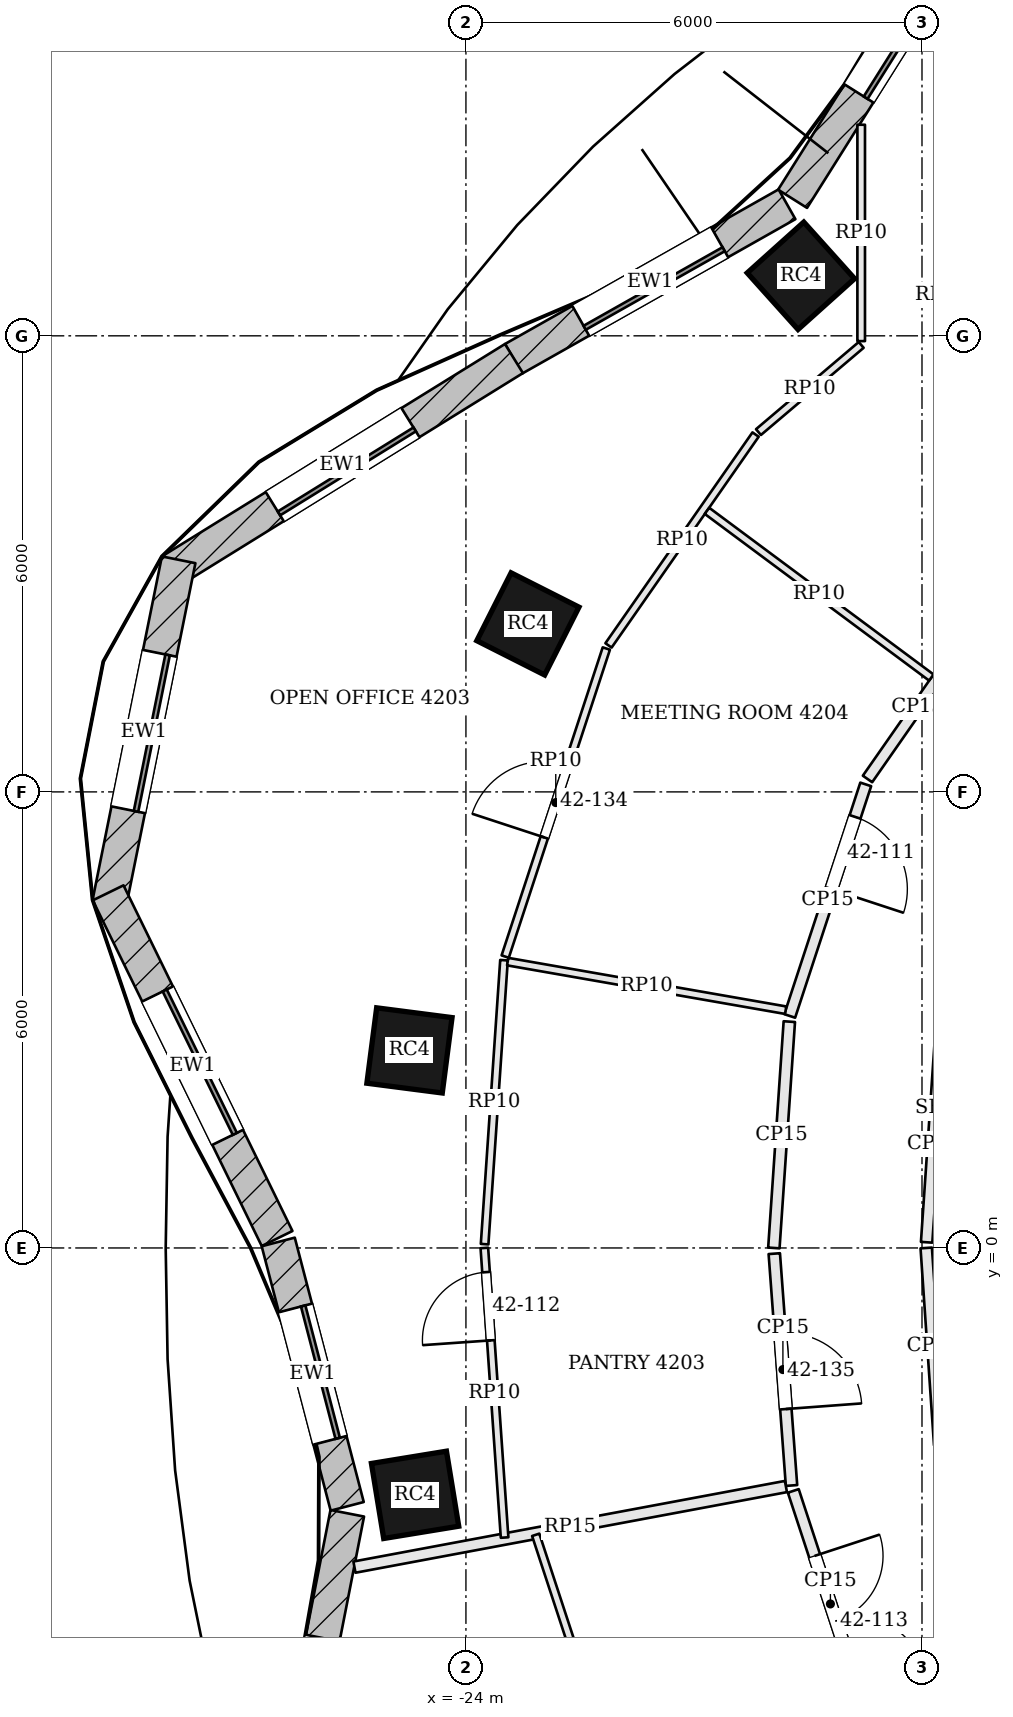
"""IFC4 building model, lengths in metres.
Left out: names, types, materials, properties, quantities, classifications, styles, units other than length and angle.
Written with IfcOpenShell. Run it as: python <this file> out.ifc"""

import sys

from ifc_helpers import new_model, si_unit, direction, frame, frame_2d, origin, origin_2d, place, context, subcontext, project, spatial, rectangle, extrude, element, fill, save


model = new_model("IFC4")
c1 = context("Model", 3, precision=1e-05, world=origin(), true_north=direction((0.0, 1.0)))
c2 = subcontext(c1, "Body", "Model", "MODEL_VIEW")
j1 = project(units=[si_unit("LENGTHUNIT", "METRE"), si_unit("PLANEANGLEUNIT", "RADIAN")], contexts=[c1])
p1 = place(None, origin())
s1 = spatial("IfcSite", under=j1, at=p1, CompositionType="ELEMENT")
p2 = place(p1, origin())
s2 = spatial("IfcBuilding", under=s1, at=p2, CompositionType="ELEMENT")
p3 = place(p2, frame((0.0, 0.0, 174.0)))
s3 = spatial("IfcBuildingStorey", under=s2, at=p3, CompositionType="ELEMENT", Elevation=174.0)
for number, where, z_axis, x_axis in (
    (1, (-19.593, 12.79, -0.7), (0.0, 0.0, 1.0), (-0.744, -0.668, 0.0)),
    (2, (-23.185, 8.21, -0.7), (0.0, 0.0, 1.0), (-0.451, -0.893, 0.0)),
    (3, (-24.743, 2.599, -0.7), (0.0, 0.0, 1.0), (-0.128, -0.992, 0.0)),
    (4, (-24.669, -3.248, -0.7), (0.0, 0.0, 1.0), (0.162, -0.987, 0.0)),
):
    element("IfcColumn", number, at=place(p3, frame(where, z_axis=z_axis, x_axis=x_axis)), inside=s3, PredefinedType="COLUMN", context=c2, shape_type="SweptSolid", body=[
        extrude(rectangle(XDim=1.0, YDim=1.0, at=origin_2d()), origin(), (0.0, 0.0, 1.0), 4.6),
    ])
p4 = place(p3, frame((-16.998, 18.099, 0.0), z_axis=(0.0, 0.0, 1.0), x_axis=(-0.532745661304, -0.846275404559, 0.0)))
e5 = element("IfcWall", 5, at=p4, inside=s3, PredefinedType="SOLIDWALL", context=c2, shape_type="SweptSolid", body=[
    extrude(rectangle(XDim=5.076, YDim=0.45, at=frame_2d((2.538, 0.0))), origin(), (0.0, 0.0, 1.0), 3.7),
])
p5 = place(p4, frame((1.638, 0.0, 0.9)))
e6 = element("IfcOpeningElement", 6, at=p5, cuts=e5, PredefinedType="OPENING", context=c2, shape_type="SweptSolid", body=[
    extrude(rectangle(XDim=1.8, YDim=2.3, at=frame_2d((0.9, 1.15))), frame((0.0, 0.235, 0.0), z_axis=(0.0, -1.0, 0.0), x_axis=(1.0, 0.0, 0.0)), (0.0, 0.0, 1.0), 0.47),
])
p6 = place(p3, frame((-19.776, 13.731, 0.0), z_axis=(0.0, 0.0, 1.0), x_axis=(-0.870610133829, -0.491973571318, 0.0)))
e7 = element("IfcWall", 7, at=p6, inside=s3, PredefinedType="SOLIDWALL", context=c2, shape_type="SweptSolid", body=[
    extrude(rectangle(XDim=4.134, YDim=0.45, at=frame_2d((2.067, 0.0))), origin(), (0.0, 0.0, 1.0), 3.7),
])
p7 = place(p6, frame((1.017, 0.0, 0.9)))
e8 = element("IfcOpeningElement", 8, at=p7, cuts=e7, PredefinedType="OPENING", context=c2, shape_type="SweptSolid", body=[
    extrude(rectangle(XDim=2.1, YDim=2.3, at=frame_2d((1.05, 1.15))), frame((0.0, 0.235, 0.0), z_axis=(0.0, -1.0, 0.0), x_axis=(1.0, 0.0, 0.0)), (0.0, 0.0, 1.0), 0.47),
])
p8 = place(p3, frame((-23.368, 11.701, 0.0), z_axis=(0.0, 0.0, 1.0), x_axis=(-0.850251408633, -0.526376806211, 0.0)))
e9 = element("IfcWall", 9, at=p8, inside=s3, PredefinedType="SOLIDWALL", context=c2, shape_type="SweptSolid", body=[
    extrude(rectangle(XDim=5.302, YDim=0.45, at=frame_2d((2.651, 0.0))), origin(), (0.0, 0.0, 1.0), 3.7),
])
p9 = place(p8, frame((1.601, 0.0, 0.9)))
e10 = element("IfcOpeningElement", 10, at=p9, cuts=e9, PredefinedType="OPENING", context=c2, shape_type="SweptSolid", body=[
    extrude(rectangle(XDim=2.1, YDim=2.3, at=frame_2d((1.05, 1.15))), frame((0.0, 0.235, 0.0), z_axis=(0.0, -1.0, 0.0), x_axis=(1.0, 0.0, 0.0)), (0.0, 0.0, 1.0), 0.47),
])
p10 = place(p3, frame((-27.78, 9.053, 0.0), z_axis=(0.0, 0.0, 1.0), x_axis=(-0.197796229105, -0.980243159503, 0.0)))
e11 = element("IfcWall", 11, at=p10, inside=s3, PredefinedType="SOLIDWALL", context=c2, shape_type="SweptSolid", body=[
    extrude(rectangle(XDim=4.61, YDim=0.45, at=frame_2d((2.305, 0.0))), origin(), (0.0, 0.0, 1.0), 3.7),
])
p11 = place(p10, frame((1.255, 0.0, 0.9)))
e12 = element("IfcOpeningElement", 12, at=p11, cuts=e11, PredefinedType="OPENING", context=c2, shape_type="SweptSolid", body=[
    extrude(rectangle(XDim=2.1, YDim=2.3, at=frame_2d((1.05, 1.15))), frame((0.0, 0.235, 0.0), z_axis=(0.0, -1.0, 0.0), x_axis=(1.0, 0.0, 0.0)), (0.0, 0.0, 1.0), 0.47),
])
p12 = place(p3, frame((-28.707, 4.672, 0.0), z_axis=(0.0, 0.0, 1.0), x_axis=(0.439053549989, -0.898460895221, 0.0)))
e13 = element("IfcWall", 13, at=p12, inside=s3, PredefinedType="SOLIDWALL", context=c2, shape_type="SweptSolid", body=[
    extrude(rectangle(XDim=5.062, YDim=0.45, at=frame_2d((2.531, 0.0))), origin(), (0.0, 0.0, 1.0), 3.7),
])
p13 = place(p12, frame((1.481, 0.0, 0.9)))
e14 = element("IfcOpeningElement", 14, at=p13, cuts=e13, PredefinedType="OPENING", context=c2, shape_type="SweptSolid", body=[
    extrude(rectangle(XDim=2.1, YDim=2.3, at=frame_2d((1.05, 1.15))), frame((0.0, 0.235, 0.0), z_axis=(0.0, -1.0, 0.0), x_axis=(1.0, 0.0, 0.0)), (0.0, 0.0, 1.0), 0.47),
])
p14 = place(p3, frame((-26.469, 0.079, 0.0), z_axis=(0.0, 0.0, 1.0), x_axis=(0.252446779859, -0.967610780913, 0.0)))
e15 = element("IfcWall", 15, at=p14, inside=s3, PredefinedType="SOLIDWALL", context=c2, shape_type="SweptSolid", body=[
    extrude(rectangle(XDim=3.595, YDim=0.45, at=frame_2d((1.797, 0.0))), origin(), (0.0, 0.0, 1.0), 3.7),
])
p15 = place(p14, frame((0.897, 0.0, 0.9)))
e16 = element("IfcOpeningElement", 16, at=p15, cuts=e15, PredefinedType="OPENING", context=c2, shape_type="SweptSolid", body=[
    extrude(rectangle(XDim=1.8, YDim=2.3, at=frame_2d((0.9, 1.15))), frame((0.0, 0.235, 0.0), z_axis=(0.0, -1.0, 0.0), x_axis=(1.0, 0.0, 0.0)), (0.0, 0.0, 1.0), 0.47),
])
p16 = place(p3, frame((-25.561, -3.49, 0.0), z_axis=(0.0, 0.0, 1.0), x_axis=(-0.192494026297, -0.981298145234, 0.0)))
e17 = element("IfcWall", 17, at=p16, inside=s3, PredefinedType="SOLIDWALL", context=c2, shape_type="SweptSolid", body=[
    extrude(rectangle(XDim=5.446, YDim=0.45, at=frame_2d((2.723, 0.0))), origin(), (0.0, 0.0, 1.0), 3.7),
])
p17 = place(p16, frame((1.673, 0.0, 0.9)))
e18 = element("IfcOpeningElement", 18, at=p17, cuts=e17, PredefinedType="OPENING", context=c2, shape_type="SweptSolid", body=[
    extrude(rectangle(XDim=2.1, YDim=2.3, at=frame_2d((1.05, 1.15))), frame((0.0, 0.235, 0.0), z_axis=(0.0, -1.0, 0.0), x_axis=(1.0, 0.0, 0.0)), (0.0, 0.0, 1.0), 0.47),
])
p18 = place(p3, frame((-17.397, 8.062, 0.0), z_axis=(0.0, 0.0, 1.0), x_axis=(-0.572118665737, -0.820170855563, 0.0)))
e19 = element("IfcWall", 19, at=p18, inside=s3, PredefinedType="PARTITIONING", context=c2, shape_type="SweptSolid", body=[
    extrude(rectangle(XDim=2.306, YDim=0.15, at=frame_2d((1.153, 0.0))), origin(), (0.0, 0.0, 1.0), 3.084),
])
p19 = place(p3, frame((-18.74, 6.099, 0.0), z_axis=(0.0, 0.0, 1.0), x_axis=(-0.31188427026, -0.950120098706, 0.0)))
e20 = element("IfcWall", 20, at=p19, inside=s3, PredefinedType="PARTITIONING", context=c2, shape_type="SweptSolid", body=[
    extrude(rectangle(XDim=3.206, YDim=0.15, at=frame_2d((1.603, 0.0))), origin(), (0.0, 0.0, 1.0), 3.084),
])
p20 = place(p19, frame((0.45, 0.0, 0.0)))
e21 = element("IfcOpeningElement", 21, at=p20, cuts=e20, PredefinedType="OPENING", context=c2, shape_type="SweptSolid", body=[
    extrude(rectangle(XDim=1.0, YDim=2.4, at=frame_2d((0.5, 1.2))), frame((0.0, 0.085, 0.0), z_axis=(0.0, -1.0, 0.0), x_axis=(1.0, 0.0, 0.0)), (0.0, 0.0, 1.0), 0.17),
])
p21 = place(p3, frame((-19.745, 2.978, 0.0), z_axis=(0.0, 0.0, 1.0), x_axis=(-0.068142324, -0.997675610447, 0.0)))
e22 = element("IfcWall", 22, at=p21, inside=s3, PredefinedType="PARTITIONING", context=c2, shape_type="SweptSolid", body=[
    extrude(rectangle(XDim=2.984, YDim=0.15, at=frame_2d((1.492, 0.0))), origin(), (0.0, 0.0, 1.0), 3.084),
])
p22 = place(p3, frame((-19.943, -0.075, 0.0), z_axis=(0.0, 0.0, 1.0), x_axis=(0.074071611523, -0.997252924973, 0.0)))
e23 = element("IfcWall", 23, at=p22, inside=s3, PredefinedType="PARTITIONING", context=c2, shape_type="SweptSolid", body=[
    extrude(rectangle(XDim=3.059, YDim=0.15, at=frame_2d((1.529, 0.0))), origin(), (0.0, 0.0, 1.0), 3.084),
])
p23 = place(p22, frame((1.05, 0.0, 0.0)))
e24 = element("IfcOpeningElement", 24, at=p23, cuts=e23, PredefinedType="OPENING", context=c2, shape_type="SweptSolid", body=[
    extrude(rectangle(XDim=1.0, YDim=2.1, at=frame_2d((0.5, 1.05))), frame((0.0, 0.085, 0.0), z_axis=(0.0, -1.0, 0.0), x_axis=(1.0, 0.0, 0.0)), (0.0, 0.0, 1.0), 0.17),
])
p24 = place(p3, frame((-25.467, -4.199, 0.0), z_axis=(0.0, 0.0, 1.0), x_axis=(0.982998787258, 0.183612048216, 0.0)))
e25 = element("IfcWall", 25, at=p24, inside=s3, PredefinedType="PARTITIONING", context=c2, shape_type="SweptSolid", body=[
    extrude(rectangle(XDim=5.775, YDim=0.15, at=frame_2d((2.887, 0.0))), origin(), (0.0, 0.0, 1.0), 3.234),
])
p25 = place(p3, frame((-19.693, -3.196, 0.0), z_axis=(0.0, 0.0, 1.0), x_axis=(0.311918951318, -0.950108713679, 0.0)))
e26 = element("IfcWall", 26, at=p25, inside=s3, PredefinedType="PARTITIONING", context=c2, shape_type="SweptSolid", body=[
    extrude(rectangle(XDim=3.13, YDim=0.15, at=frame_2d((1.565, 0.0))), origin(), (0.0, 0.0, 1.0), 3.084),
])
p26 = place(p25, frame((0.9, 0.0, 0.0)))
e27 = element("IfcOpeningElement", 27, at=p26, cuts=e26, PredefinedType="OPENING", context=c2, shape_type="SweptSolid", body=[
    extrude(rectangle(XDim=1.8, YDim=2.1, at=frame_2d((0.9, 1.05))), frame((0.0, 0.085, 0.0), z_axis=(0.0, -1.0, 0.0), x_axis=(1.0, 0.0, 0.0)), (0.0, 0.0, 1.0), 0.17),
])
p27 = place(p3, frame((-17.767, -2.592, 0.0), z_axis=(0.0, 0.0, 1.0), x_axis=(-0.068140828228, 0.997675712608, 0.0)))
e28 = element("IfcWall", 28, at=p27, inside=s3, PredefinedType="PARTITIONING", context=c2, shape_type="SweptSolid", body=[
    extrude(rectangle(XDim=2.598, YDim=0.15, at=frame_2d((1.299, 0.0))), origin(), (0.0, 0.0, 1.0), 3.084),
])
p28 = place(p3, frame((-17.939, 0.075, 0.0), z_axis=(0.0, 0.0, 1.0), x_axis=(0.068227980697, 0.997669756307, 0.0)))
e29 = element("IfcWall", 29, at=p28, inside=s3, PredefinedType="PARTITIONING", context=c2, shape_type="SweptSolid", body=[
    extrude(rectangle(XDim=2.598, YDim=0.15, at=frame_2d((1.299, 0.0))), origin(), (0.0, 0.0, 1.0), 3.084),
])
p29 = place(p3, frame((-23.491, -3.81, 0.0), z_axis=(0.0, 0.0, 1.0), x_axis=(-0.069811314636, 0.997560213896, 0.0)))
e30 = element("IfcWall", 30, at=p29, inside=s3, PredefinedType="PARTITIONING", context=c2, shape_type="SweptSolid", body=[
    extrude(rectangle(XDim=3.819, YDim=0.1, at=frame_2d((1.909, 0.0))), origin(), (0.0, 0.0, 1.0), 3.084),
])
p30 = place(p29, frame((2.6, 0.0, 0.0)))
e31 = element("IfcOpeningElement", 31, at=p30, cuts=e30, PredefinedType="OPENING", context=c2, shape_type="SweptSolid", body=[
    extrude(rectangle(XDim=0.9, YDim=2.1, at=frame_2d((0.45, 1.05))), frame((0.0, 0.06, 0.0), z_axis=(0.0, -1.0, 0.0), x_axis=(1.0, 0.0, 0.0)), (0.0, 0.0, 1.0), 0.12),
])
p31 = place(p3, frame((-23.754, 0.05, 0.0), z_axis=(0.0, 0.0, 1.0), x_axis=(0.068193493527, 0.997672114194, 0.0)))
e32 = element("IfcWall", 32, at=p31, inside=s3, PredefinedType="PARTITIONING", context=c2, shape_type="SweptSolid", body=[
    extrude(rectangle(XDim=3.745, YDim=0.1, at=frame_2d((1.873, 0.0))), origin(), (0.0, 0.0, 1.0), 3.084),
])
p32 = place(p3, frame((-23.483, 3.833, 0.0), z_axis=(0.0, 0.0, 1.0), x_axis=(0.311880220566, 0.95012142804, 0.0)))
e33 = element("IfcWall", 33, at=p32, inside=s3, PredefinedType="PARTITIONING", context=c2, shape_type="SweptSolid", body=[
    extrude(rectangle(XDim=4.265, YDim=0.1, at=frame_2d((2.133, 0.0))), origin(), (0.0, 0.0, 1.0), 3.084),
])
p33 = place(p32, frame((1.65, 0.0, 0.0)))
e34 = element("IfcOpeningElement", 34, at=p33, cuts=e33, PredefinedType="OPENING", context=c2, shape_type="SweptSolid", body=[
    extrude(rectangle(XDim=1.0, YDim=2.4, at=frame_2d((0.5, 1.2))), frame((0.0, 0.06, 0.0), z_axis=(0.0, -1.0, 0.0), x_axis=(1.0, 0.0, 0.0)), (0.0, 0.0, 1.0), 0.12),
])
p34 = place(p3, frame((-22.125, 7.927, 0.0), z_axis=(0.0, 0.0, 1.0), x_axis=(0.572100301866, 0.820183665166, 0.0)))
e35 = element("IfcWall", 35, at=p34, inside=s3, PredefinedType="PARTITIONING", context=c2, shape_type="SweptSolid", body=[
    extrude(rectangle(XDim=3.382, YDim=0.1, at=frame_2d((1.691, 0.0))), origin(), (0.0, 0.0, 1.0), 3.084),
])
p35 = place(p3, frame((-20.151, 10.734, 0.0), z_axis=(0.0, 0.0, 1.0), x_axis=(0.762465888028, 0.647028414827, 0.0)))
e36 = element("IfcWall", 36, at=p35, inside=s3, PredefinedType="PARTITIONING", context=c2, shape_type="SweptSolid", body=[
    extrude(rectangle(XDim=1.772, YDim=0.1, at=frame_2d((0.886, 0.0))), origin(), (0.0, 0.0, 1.0), 3.084),
])
p36 = place(p3, frame((-18.8, 11.93, 0.0), z_axis=(0.0, 0.0, 1.0), x_axis=(0.0, 1.0, 0.0)))
e37 = element("IfcWall", 37, at=p36, inside=s3, PredefinedType="PARTITIONING", context=c2, shape_type="SweptSolid", body=[
    extrude(rectangle(XDim=2.846, YDim=0.1, at=frame_2d((1.423, 0.0))), origin(), (0.0, 0.0, 1.0), 3.084),
])
p37 = place(p3, frame((-17.877, 7.505, 0.0), z_axis=(0.0, 0.0, 1.0), x_axis=(-0.802692989486, 0.596392458563, 0.0)))
e38 = element("IfcWall", 38, at=p37, inside=s3, PredefinedType="PARTITIONING", context=c2, shape_type="SweptSolid", body=[
    extrude(rectangle(XDim=3.677, YDim=0.1, at=frame_2d((1.838, 0.0))), origin(), (0.0, 0.0, 1.0), 3.084),
])
p38 = place(p3, frame((-19.794, 3.128, 0.0), z_axis=(0.0, 0.0, 1.0), x_axis=(-0.985065623684, 0.172179316518, 0.0)))
e39 = element("IfcWall", 39, at=p38, inside=s3, PredefinedType="PARTITIONING", context=c2, shape_type="SweptSolid", body=[
    extrude(rectangle(XDim=3.712, YDim=0.1, at=frame_2d((1.856, 0.0))), origin(), (0.0, 0.0, 1.0), 3.084),
])
p39 = place(p3, frame((-21.807, -7.658, 0.0), z_axis=(0.0, 0.0, 1.0), x_axis=(-0.311924580949, 0.950106865463, 0.0)))
e40 = element("IfcWall", 40, at=p39, inside=s3, PredefinedType="PARTITIONING", context=c2, shape_type="SweptSolid", body=[
    extrude(rectangle(XDim=4.088, YDim=0.1, at=frame_2d((2.044, 0.0))), origin(), (0.0, 0.0, 1.0), 3.084),
])
p40 = place(p39, frame((0.699, 0.0, 0.0)))
e41 = element("IfcOpeningElement", 41, at=p40, cuts=e40, PredefinedType="OPENING", context=c2, shape_type="SweptSolid", body=[
    extrude(rectangle(XDim=1.0, YDim=2.1, at=frame_2d((0.5, 1.05))), frame((0.0, 0.06, 0.0), z_axis=(0.0, -1.0, 0.0), x_axis=(1.0, 0.0, 0.0)), (0.0, 0.0, 1.0), 0.12),
])
p41 = place(p5, origin())
e42 = element("IfcWindow", 42, at=p41, inside=s3, PartitioningType="SINGLE_PANEL", PredefinedType="WINDOW", context=c2, shape_type="SweptSolid", body=[
    extrude(rectangle(XDim=1.8, YDim=2.3, at=frame_2d((0.9, 1.15))), frame((0.0, 0.135, 0.0), z_axis=(0.0, -1.0, 0.0), x_axis=(1.0, 0.0, 0.0)), (0.0, 0.0, 1.0), 0.06),
])
fill(e6, e42)
p42 = place(p7, origin())
e43 = element("IfcWindow", 43, at=p42, inside=s3, PartitioningType="SINGLE_PANEL", PredefinedType="WINDOW", context=c2, shape_type="SweptSolid", body=[
    extrude(rectangle(XDim=2.1, YDim=2.3, at=frame_2d((1.05, 1.15))), frame((0.0, 0.135, 0.0), z_axis=(0.0, -1.0, 0.0), x_axis=(1.0, 0.0, 0.0)), (0.0, 0.0, 1.0), 0.06),
])
fill(e8, e43)
p43 = place(p9, origin())
e44 = element("IfcWindow", 44, at=p43, inside=s3, PartitioningType="SINGLE_PANEL", PredefinedType="WINDOW", context=c2, shape_type="SweptSolid", body=[
    extrude(rectangle(XDim=2.1, YDim=2.3, at=frame_2d((1.05, 1.15))), frame((0.0, 0.135, 0.0), z_axis=(0.0, -1.0, 0.0), x_axis=(1.0, 0.0, 0.0)), (0.0, 0.0, 1.0), 0.06),
])
fill(e10, e44)
p44 = place(p11, origin())
e45 = element("IfcWindow", 45, at=p44, inside=s3, PartitioningType="SINGLE_PANEL", PredefinedType="WINDOW", context=c2, shape_type="SweptSolid", body=[
    extrude(rectangle(XDim=2.1, YDim=2.3, at=frame_2d((1.05, 1.15))), frame((0.0, 0.135, 0.0), z_axis=(0.0, -1.0, 0.0), x_axis=(1.0, 0.0, 0.0)), (0.0, 0.0, 1.0), 0.06),
])
fill(e12, e45)
p45 = place(p13, origin())
e46 = element("IfcWindow", 46, at=p45, inside=s3, PartitioningType="SINGLE_PANEL", PredefinedType="WINDOW", context=c2, shape_type="SweptSolid", body=[
    extrude(rectangle(XDim=2.1, YDim=2.3, at=frame_2d((1.05, 1.15))), frame((0.0, 0.135, 0.0), z_axis=(0.0, -1.0, 0.0), x_axis=(1.0, 0.0, 0.0)), (0.0, 0.0, 1.0), 0.06),
])
fill(e14, e46)
p46 = place(p15, origin())
e47 = element("IfcWindow", 47, at=p46, inside=s3, PartitioningType="SINGLE_PANEL", PredefinedType="WINDOW", context=c2, shape_type="SweptSolid", body=[
    extrude(rectangle(XDim=1.8, YDim=2.3, at=frame_2d((0.9, 1.15))), frame((0.0, 0.135, 0.0), z_axis=(0.0, -1.0, 0.0), x_axis=(1.0, 0.0, 0.0)), (0.0, 0.0, 1.0), 0.06),
])
fill(e16, e47)
p47 = place(p20, origin())
e48 = element("IfcDoor", 48, at=p47, inside=s3, OperationType="SINGLE_SWING_RIGHT", PredefinedType="DOOR", context=c2, shape_type="SweptSolid", body=[
    extrude(rectangle(XDim=1.0, YDim=2.4, at=frame_2d((0.5, 1.2))), frame((0.0, 0.025, 0.0), z_axis=(0.0, -1.0, 0.0), x_axis=(1.0, 0.0, 0.0)), (0.0, 0.0, 1.0), 0.05),
])
fill(e21, e48)
p48 = place(p30, origin())
e49 = element("IfcDoor", 49, at=p48, inside=s3, OperationType="SINGLE_SWING_LEFT", PredefinedType="DOOR", context=c2, shape_type="SweptSolid", body=[
    extrude(rectangle(XDim=0.9, YDim=2.1, at=frame_2d((0.45, 1.05))), frame((0.0, 0.025, 0.0), z_axis=(0.0, -1.0, 0.0), x_axis=(1.0, 0.0, 0.0)), (0.0, 0.0, 1.0), 0.05),
])
fill(e31, e49)
p49 = place(p26, origin())
e50 = element("IfcDoor", 50, at=p49, inside=s3, OperationType="DOUBLE_DOOR_SINGLE_SWING", PredefinedType="DOOR", context=c2, shape_type="SweptSolid", body=[
    extrude(rectangle(XDim=1.8, YDim=2.1, at=frame_2d((0.9, 1.05))), frame((0.0, 0.025, 0.0), z_axis=(0.0, -1.0, 0.0), x_axis=(1.0, 0.0, 0.0)), (0.0, 0.0, 1.0), 0.05),
])
fill(e27, e50)
p50 = place(p33, origin())
e51 = element("IfcDoor", 51, at=p50, inside=s3, OperationType="SINGLE_SWING_LEFT", PredefinedType="DOOR", context=c2, shape_type="SweptSolid", body=[
    extrude(rectangle(XDim=1.0, YDim=2.4, at=frame_2d((0.5, 1.2))), frame((0.0, 0.025, 0.0), z_axis=(0.0, -1.0, 0.0), x_axis=(1.0, 0.0, 0.0)), (0.0, 0.0, 1.0), 0.05),
])
fill(e34, e51)
p51 = place(p23, origin())
e52 = element("IfcDoor", 52, at=p51, inside=s3, OperationType="SINGLE_SWING_RIGHT", PredefinedType="DOOR", context=c2, shape_type="SweptSolid", body=[
    extrude(rectangle(XDim=1.0, YDim=2.1, at=frame_2d((0.5, 1.05))), frame((0.0, 0.025, 0.0), z_axis=(0.0, -1.0, 0.0), x_axis=(1.0, 0.0, 0.0)), (0.0, 0.0, 1.0), 0.05),
])
fill(e24, e52)
save(model, sys.argv[1])
